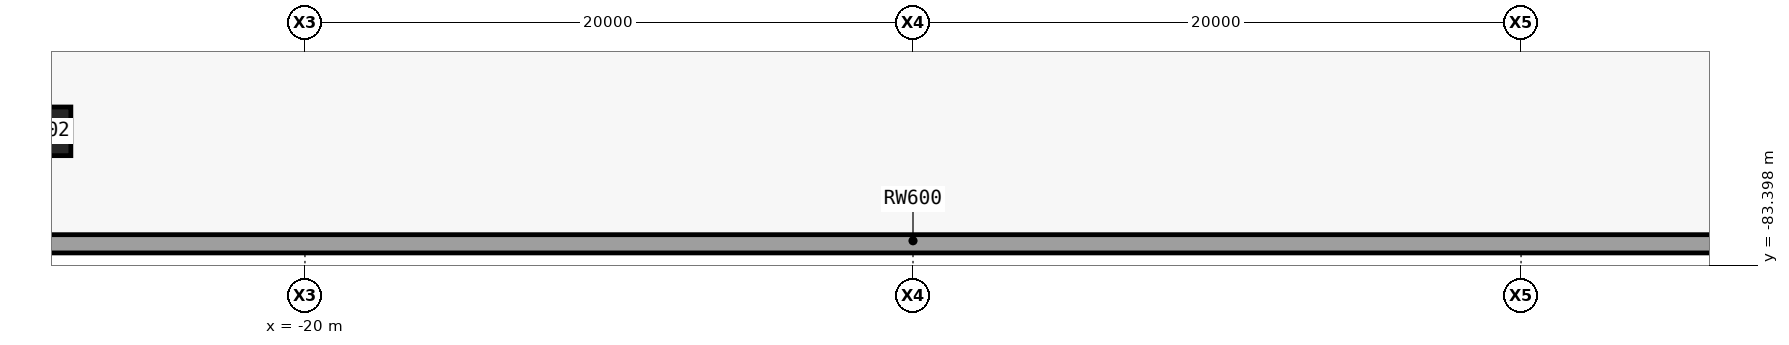
"""IFC4 building model, lengths in metres.
Left out: names, types, materials, properties, quantities, classifications, styles, units other than length and angle.
Written with IfcOpenShell. Run it as: python <this file> out.ifc"""

import sys

from ifc_helpers import new_model, si_unit, direction, frame, origin, origin_2d, place, context, subcontext, project, spatial, polyline, rectangle, outline, extrude, element, save


model = new_model("IFC4")
c1 = context("Model", 3, precision=1e-05, world=origin(), true_north=direction((0.0, 1.0)))
c2 = subcontext(c1, "Body", "Model", "MODEL_VIEW")
j1 = project(units=[si_unit("LENGTHUNIT", "METRE"), si_unit("PLANEANGLEUNIT", "RADIAN")], contexts=[c1])
p1 = place(None, origin())
s1 = spatial("IfcSite", under=j1, at=p1, CompositionType="ELEMENT")
p2 = place(p1, origin())
s2 = spatial("IfcBuilding", under=s1, at=p2, CompositionType="ELEMENT")
p3 = place(p2, frame((0.0, 0.0, -4.5)))
s3 = spatial("IfcBuildingStorey", under=s2, at=p3, CompositionType="ELEMENT", Elevation=-4.5)
p4 = place(p3, frame((-51.0, -82.7, 0.0), z_axis=(0.0, 0.0, 1.0), x_axis=(1.0, 0.0, 0.0)))
e1 = element("IfcWall", 1, at=p4, inside=s3, PredefinedType="SOLIDWALL", context=c2, shape_type="SweptSolid", body=[
    extrude(outline(polyline([(0.0, -0.3), (0.0, 0.3), (0.6, 0.3), (101.4, 0.3), (102.0, 0.3), (102.0, -0.3), (0.0, -0.3)])), origin(), (0.0, 0.0, 1.0), 4.5),
])
p5 = place(p3, frame((-28.5, -79.0, 0.0), z_axis=(0.0, 0.0, 1.0), x_axis=(1.0, 0.0, 0.0)))
e2 = element("IfcColumn", 2, at=p5, inside=s3, PredefinedType="COLUMN", context=c2, shape_type="SweptSolid", body=[
    extrude(rectangle(XDim=1.6, YDim=1.6, at=origin_2d()), origin(), (0.0, 0.0, 1.0), 4.5),
])
save(model, sys.argv[1])
